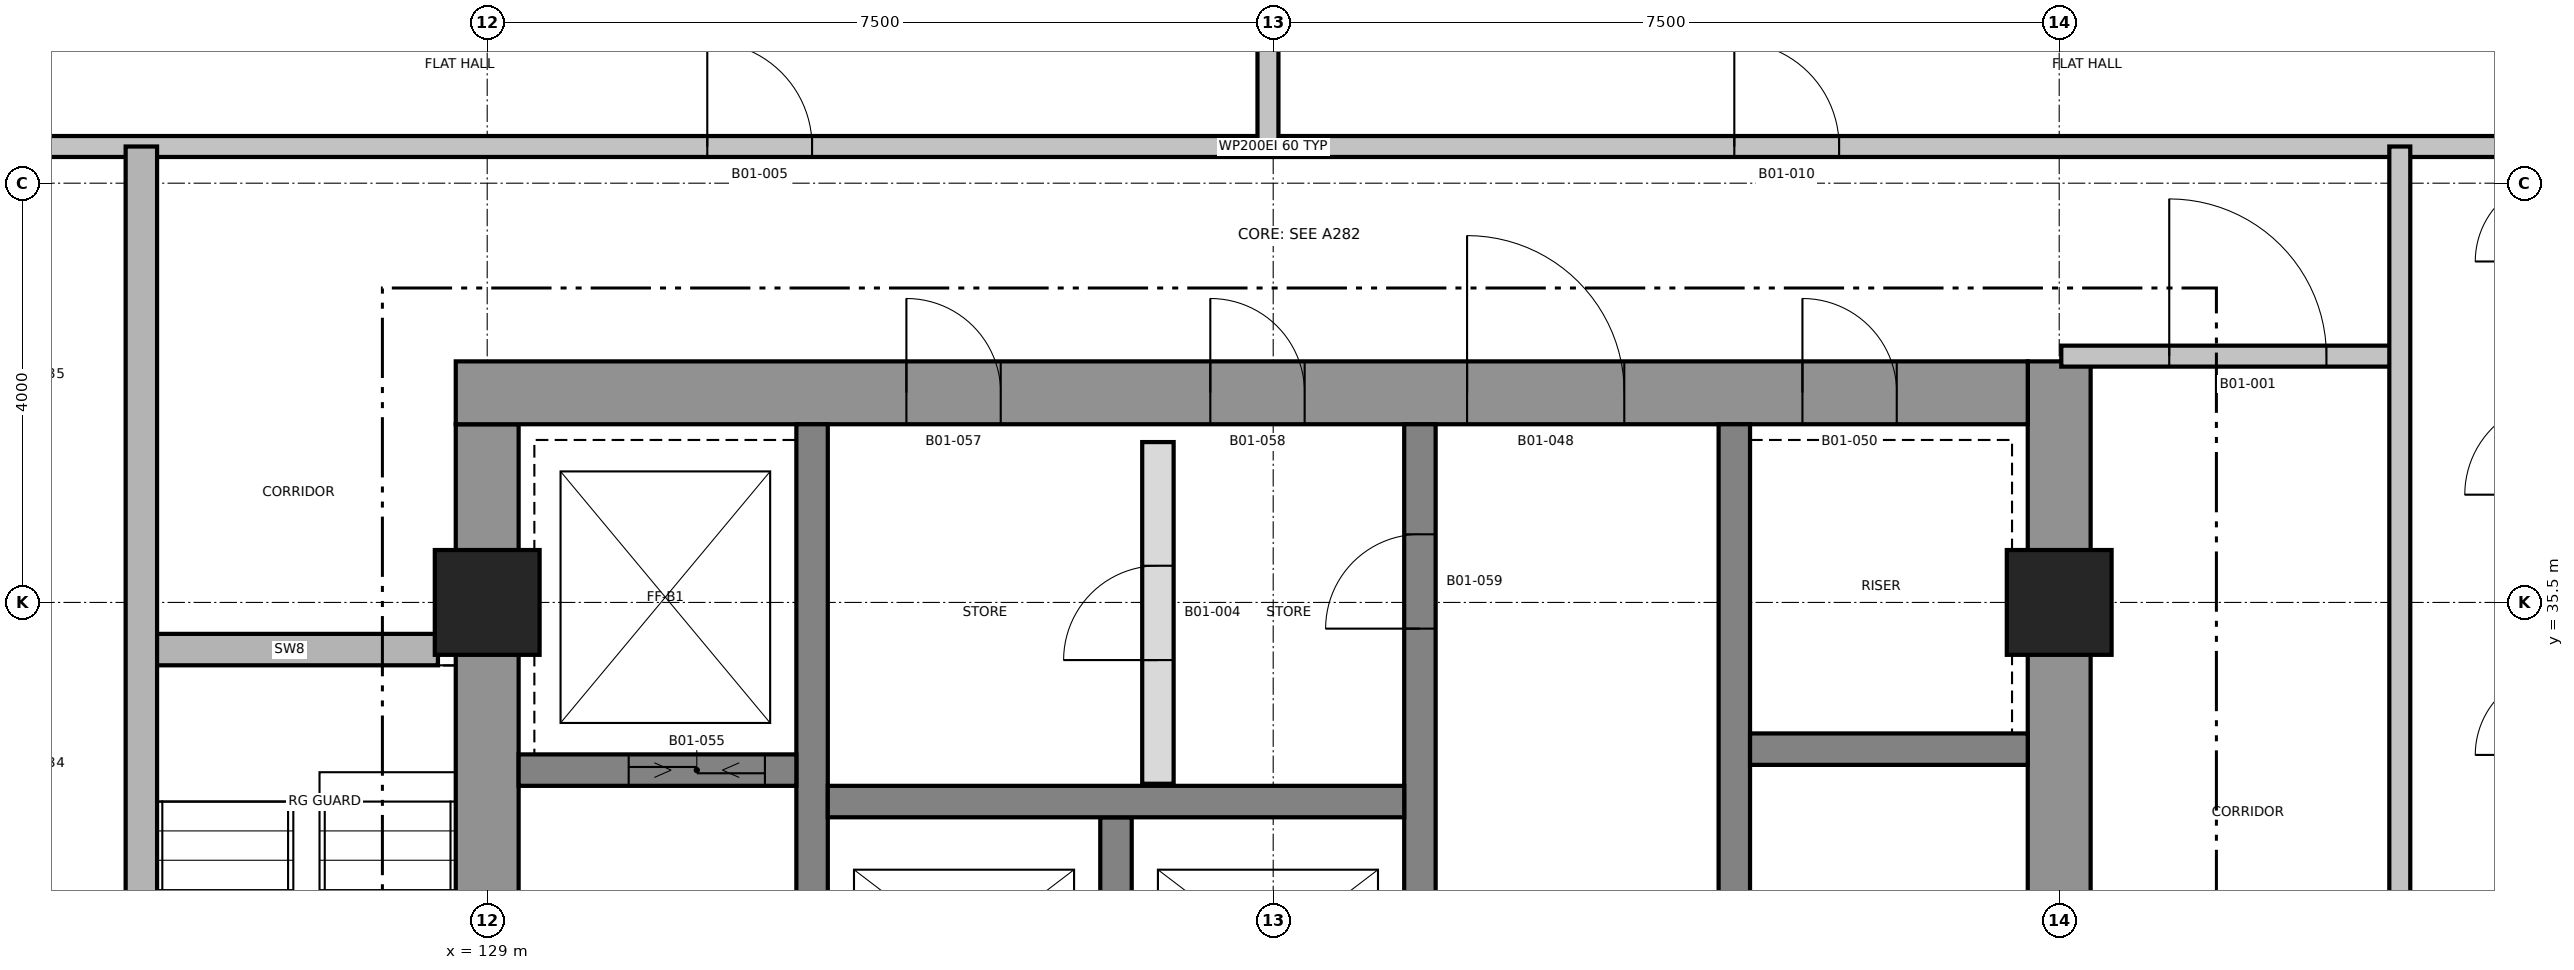
"""IFC4 building model, lengths in metres.
Left out: names, types, materials, properties, quantities, classifications, styles, units other than length and angle.
Written with IfcOpenShell. Run it as: python <this file> out.ifc"""

import sys

from ifc_helpers import new_model, si_unit, direction, frame, frame_2d, origin, origin_2d, place, context, subcontext, project, spatial, rectangle, extrude, element, fill, save


model = new_model("IFC4")
c1 = context("Model", 3, precision=1e-05, world=origin(), true_north=direction((0.0, 1.0)))
c2 = subcontext(c1, "Body", "Model", "MODEL_VIEW")
j1 = project(units=[si_unit("LENGTHUNIT", "METRE"), si_unit("PLANEANGLEUNIT", "RADIAN")], contexts=[c1])
p1 = place(None, origin())
s1 = spatial("IfcSite", under=j1, at=p1, CompositionType="ELEMENT")
p2 = place(p1, origin())
s2 = spatial("IfcBuilding", under=s1, at=p2, CompositionType="ELEMENT")
p3 = place(p2, frame((0.0, 0.0, 37.2)))
s3 = spatial("IfcBuildingStorey", under=s2, at=p3, CompositionType="ELEMENT", Elevation=37.2)
p4 = place(p3, frame((129.0, 24.8, 0.0), z_axis=(0.0, 0.0, 1.0), x_axis=(0.0, 1.0, 0.0)))
e1 = element("IfcWall", 1, at=p4, inside=s3, PredefinedType="SHEAR", context=c2, shape_type="SweptSolid", body=[
    extrude(rectangle(XDim=12.4, YDim=0.6, at=frame_2d((6.2, 0.0))), origin(), (0.0, 0.0, 1.0), 3.7),
])
p5 = place(p4, frame((5.15, 0.0, 0.0)))
e2 = element("IfcOpeningElement", 2, at=p5, cuts=e1, PredefinedType="OPENING", context=c2, shape_type="SweptSolid", body=[
    extrude(rectangle(XDim=1.0, YDim=2.1, at=frame_2d((0.5, 1.05))), frame((0.0, 0.31, 0.0), z_axis=(0.0, -1.0, 0.0), x_axis=(1.0, 0.0, 0.0)), (0.0, 0.0, 1.0), 0.62),
])
p6 = place(p3, frame((144.0, 24.2, 0.0), z_axis=(0.0, 0.0, 1.0), x_axis=(0.0, 1.0, 0.0)))
e3 = element("IfcWall", 3, at=p6, inside=s3, PredefinedType="SHEAR", context=c2, shape_type="SweptSolid", body=[
    extrude(rectangle(XDim=13.6, YDim=0.6, at=frame_2d((6.8, 0.0))), origin(), (0.0, 0.0, 1.0), 3.7),
])
p7 = place(p3, frame((128.7, 37.5, 0.0), z_axis=(0.0, 0.0, 1.0), x_axis=(1.0, 0.0, 0.0)))
e4 = element("IfcWall", 4, at=p7, inside=s3, PredefinedType="SHEAR", context=c2, shape_type="SweptSolid", body=[
    extrude(rectangle(XDim=15.0, YDim=0.6, at=frame_2d((7.5, 0.0))), origin(), (0.0, 0.0, 1.0), 3.7),
])
p8 = place(p7, frame((9.65, 0.0, 0.0)))
e5 = element("IfcOpeningElement", 5, at=p8, cuts=e4, PredefinedType="OPENING", context=c2, shape_type="SweptSolid", body=[
    extrude(rectangle(XDim=1.5, YDim=2.1, at=frame_2d((0.75, 1.05))), frame((0.0, 0.31, 0.0), z_axis=(0.0, -1.0, 0.0), x_axis=(1.0, 0.0, 0.0)), (0.0, 0.0, 1.0), 0.62),
])
p9 = place(p7, frame((12.85, 0.0, 0.0)))
e6 = element("IfcOpeningElement", 6, at=p9, cuts=e4, PredefinedType="OPENING", context=c2, shape_type="SweptSolid", body=[
    extrude(rectangle(XDim=0.9, YDim=2.1, at=frame_2d((0.45, 1.05))), frame((0.0, 0.31, 0.0), z_axis=(0.0, -1.0, 0.0), x_axis=(1.0, 0.0, 0.0)), (0.0, 0.0, 1.0), 0.62),
])
p10 = place(p7, frame((4.3, 0.0, 0.0)))
e7 = element("IfcOpeningElement", 7, at=p10, cuts=e4, PredefinedType="OPENING", context=c2, shape_type="SweptSolid", body=[
    extrude(rectangle(XDim=0.9, YDim=2.1, at=frame_2d((0.45, 1.05))), frame((0.0, 0.31, 0.0), z_axis=(0.0, -1.0, 0.0), x_axis=(1.0, 0.0, 0.0)), (0.0, 0.0, 1.0), 0.62),
])
p11 = place(p7, frame((7.2, 0.0, 0.0)))
e8 = element("IfcOpeningElement", 8, at=p11, cuts=e4, PredefinedType="OPENING", context=c2, shape_type="SweptSolid", body=[
    extrude(rectangle(XDim=0.9, YDim=2.1, at=frame_2d((0.45, 1.05))), frame((0.0, 0.31, 0.0), z_axis=(0.0, -1.0, 0.0), x_axis=(1.0, 0.0, 0.0)), (0.0, 0.0, 1.0), 0.62),
])
p12 = place(p3, frame((132.1, 24.8, 0.0), z_axis=(0.0, 0.0, 1.0), x_axis=(0.0, 1.0, 0.0)))
e9 = element("IfcWall", 9, at=p12, inside=s3, PredefinedType="SHEAR", context=c2, shape_type="SweptSolid", body=[
    extrude(rectangle(XDim=12.4, YDim=0.3, at=frame_2d((6.2, 0.0))), origin(), (0.0, 0.0, 1.0), 3.7),
])
p13 = place(p12, frame((3.9, 0.0, 0.0)))
e10 = element("IfcOpeningElement", 10, at=p13, cuts=e9, PredefinedType="OPENING", context=c2, shape_type="SweptSolid", body=[
    extrude(rectangle(XDim=1.2, YDim=2.1, at=frame_2d((0.6, 1.05))), frame((0.0, 0.16, 0.0), z_axis=(0.0, -1.0, 0.0), x_axis=(1.0, 0.0, 0.0)), (0.0, 0.0, 1.0), 0.32),
])
p14 = place(p3, frame((137.9, 24.8, 0.0), z_axis=(0.0, 0.0, 1.0), x_axis=(0.0, 1.0, 0.0)))
e11 = element("IfcWall", 11, at=p14, inside=s3, PredefinedType="SHEAR", context=c2, shape_type="SweptSolid", body=[
    extrude(rectangle(XDim=12.4, YDim=0.3, at=frame_2d((6.2, 0.0))), origin(), (0.0, 0.0, 1.0), 3.7),
])
p15 = place(p14, frame((3.95, 0.0, 0.0)))
e12 = element("IfcOpeningElement", 12, at=p15, cuts=e11, PredefinedType="OPENING", context=c2, shape_type="SweptSolid", body=[
    extrude(rectangle(XDim=1.5, YDim=2.1, at=frame_2d((0.75, 1.05))), frame((0.0, 0.16, 0.0), z_axis=(0.0, -1.0, 0.0), x_axis=(1.0, 0.0, 0.0)), (0.0, 0.0, 1.0), 0.32),
])
p16 = place(p14, frame((10.45, 0.0, 0.0)))
e13 = element("IfcOpeningElement", 13, at=p16, cuts=e11, PredefinedType="OPENING", context=c2, shape_type="SweptSolid", body=[
    extrude(rectangle(XDim=0.9, YDim=2.1, at=frame_2d((0.45, 1.05))), frame((0.0, 0.16, 0.0), z_axis=(0.0, -1.0, 0.0), x_axis=(1.0, 0.0, 0.0)), (0.0, 0.0, 1.0), 0.32),
])
p17 = place(p3, frame((140.9, 24.8, 0.0), z_axis=(0.0, 0.0, 1.0), x_axis=(0.0, 1.0, 0.0)))
e14 = element("IfcWall", 14, at=p17, inside=s3, PredefinedType="SHEAR", context=c2, shape_type="SweptSolid", body=[
    extrude(rectangle(XDim=12.4, YDim=0.3, at=frame_2d((6.2, 0.0))), origin(), (0.0, 0.0, 1.0), 3.7),
])
p18 = place(p17, frame((5.9, 0.0, 0.0)))
e15 = element("IfcOpeningElement", 15, at=p18, cuts=e14, PredefinedType="OPENING", context=c2, shape_type="SweptSolid", body=[
    extrude(rectangle(XDim=1.2, YDim=2.1, at=frame_2d((0.6, 1.05))), frame((0.0, 0.16, 0.0), z_axis=(0.0, -1.0, 0.0), x_axis=(1.0, 0.0, 0.0)), (0.0, 0.0, 1.0), 0.32),
])
p19 = place(p3, frame((135.0, 30.85, 0.0), z_axis=(0.0, 0.0, 1.0), x_axis=(0.0, 1.0, 0.0)))
e16 = element("IfcWall", 16, at=p19, inside=s3, PredefinedType="SHEAR", context=c2, shape_type="SweptSolid", body=[
    extrude(rectangle(XDim=2.6, YDim=0.3, at=frame_2d((1.3, 0.0))), origin(), (0.0, 0.0, 1.0), 3.7),
])
p20 = place(p3, frame((132.25, 33.6, 0.0), z_axis=(0.0, 0.0, 1.0), x_axis=(1.0, 0.0, 0.0)))
e17 = element("IfcWall", 17, at=p20, inside=s3, PredefinedType="SHEAR", context=c2, shape_type="SweptSolid", body=[
    extrude(rectangle(XDim=5.5, YDim=0.3, at=frame_2d((2.75, 0.0))), origin(), (0.0, 0.0, 1.0), 3.7),
])
p21 = place(p3, frame((129.3, 33.9, 0.0), z_axis=(0.0, 0.0, 1.0), x_axis=(1.0, 0.0, 0.0)))
e18 = element("IfcWall", 18, at=p21, inside=s3, PredefinedType="SHEAR", context=c2, shape_type="SweptSolid", body=[
    extrude(rectangle(XDim=2.65, YDim=0.3, at=frame_2d((1.325, 0.0))), origin(), (0.0, 0.0, 1.0), 3.7),
])
p22 = place(p21, frame((1.05, 0.0, 0.0)))
e19 = element("IfcOpeningElement", 19, at=p22, cuts=e18, PredefinedType="OPENING", context=c2, shape_type="SweptSolid", body=[
    extrude(rectangle(XDim=1.3, YDim=2.4, at=frame_2d((0.65, 1.2))), frame((0.0, 0.16, 0.0), z_axis=(0.0, -1.0, 0.0), x_axis=(1.0, 0.0, 0.0)), (0.0, 0.0, 1.0), 0.32),
])
p23 = place(p3, frame((141.05, 34.1, 0.0), z_axis=(0.0, 0.0, 1.0), x_axis=(1.0, 0.0, 0.0)))
e20 = element("IfcWall", 20, at=p23, inside=s3, PredefinedType="SHEAR", context=c2, shape_type="SweptSolid", body=[
    extrude(rectangle(XDim=2.65, YDim=0.3, at=frame_2d((1.325, 0.0))), origin(), (0.0, 0.0, 1.0), 3.7),
])
for number, where, z_axis, x_axis in (
    (21, (129.0, 35.5, 0.0), (0.0, 0.0, 1.0), (1.0, 0.0, 0.0)),
    (22, (144.0, 35.5, 0.0), (0.0, 0.0, 1.0), (1.0, 0.0, 0.0)),
):
    element("IfcColumn", number, at=place(p3, frame(where, z_axis=z_axis, x_axis=x_axis)), inside=s3, PredefinedType="COLUMN", context=c2, shape_type="SweptSolid", body=[
        extrude(rectangle(XDim=1.0, YDim=1.0, at=origin_2d()), origin(), (0.0, 0.0, 1.0), 3.7),
    ])
p24 = place(p3, frame((125.7, 35.05, 0.0), z_axis=(0.0, 0.0, 1.0), x_axis=(1.0, 0.0, 0.0)))
e23 = element("IfcWall", 23, at=p24, inside=s3, PredefinedType="SHEAR", context=c2, shape_type="SweptSolid", body=[
    extrude(rectangle(XDim=2.83, YDim=0.3, at=frame_2d((1.415, 0.0))), origin(), (0.0, 0.0, 1.0), 3.4),
])
p25 = place(p3, frame((144.02, 37.85, 0.0), z_axis=(0.0, 0.0, 1.0), x_axis=(1.0, 0.0, 0.0)))
e24 = element("IfcWall", 24, at=p25, inside=s3, PredefinedType="PARTITIONING", context=c2, shape_type="SweptSolid", body=[
    extrude(rectangle(XDim=3.23, YDim=0.2, at=frame_2d((1.615, 0.0))), origin(), (0.0, 0.0, 1.0), 3.4),
])
p26 = place(p25, frame((1.03, 0.0, 0.0)))
e25 = element("IfcOpeningElement", 25, at=p26, cuts=e24, PredefinedType="OPENING", context=c2, shape_type="SweptSolid", body=[
    extrude(rectangle(XDim=1.5, YDim=2.1, at=frame_2d((0.75, 1.05))), frame((0.0, 0.11, 0.0), z_axis=(0.0, -1.0, 0.0), x_axis=(1.0, 0.0, 0.0)), (0.0, 0.0, 1.0), 0.22),
])
p27 = place(p3, frame((120.89, 39.85, 0.0), z_axis=(0.0, 0.0, 1.0), x_axis=(1.0, 0.0, 0.0)))
e26 = element("IfcWall", 26, at=p27, inside=s3, PredefinedType="PARTITIONING", context=c2, shape_type="SweptSolid", body=[
    extrude(rectangle(XDim=31.22, YDim=0.2, at=frame_2d((15.61, 0.0))), origin(), (0.0, 0.0, 1.0), 3.4),
])
p28 = place(p27, frame((10.21, 0.0, 0.0)))
e27 = element("IfcOpeningElement", 27, at=p28, cuts=e26, PredefinedType="OPENING", context=c2, shape_type="SweptSolid", body=[
    extrude(rectangle(XDim=1.0, YDim=2.1, at=frame_2d((0.5, 1.05))), frame((0.0, 0.11, 0.0), z_axis=(0.0, -1.0, 0.0), x_axis=(1.0, 0.0, 0.0)), (0.0, 0.0, 1.0), 0.22),
])
p29 = place(p27, frame((20.01, 0.0, 0.0)))
e28 = element("IfcOpeningElement", 28, at=p29, cuts=e26, PredefinedType="OPENING", context=c2, shape_type="SweptSolid", body=[
    extrude(rectangle(XDim=1.0, YDim=2.1, at=frame_2d((0.5, 1.05))), frame((0.0, 0.11, 0.0), z_axis=(0.0, -1.0, 0.0), x_axis=(1.0, 0.0, 0.0)), (0.0, 0.0, 1.0), 0.22),
])
p30 = place(p3, frame((125.7, 22.15, 0.0), z_axis=(0.0, 0.0, 1.0), x_axis=(0.0, 1.0, 0.0)))
e29 = element("IfcWall", 29, at=p30, inside=s3, PredefinedType="SHEAR", context=c2, shape_type="SweptSolid", body=[
    extrude(rectangle(XDim=17.7, YDim=0.3, at=frame_2d((8.85, 0.0))), origin(), (0.0, 0.0, 1.0), 3.4),
])
p31 = place(p30, frame((2.7, 0.0, 0.0)))
e30 = element("IfcOpeningElement", 30, at=p31, cuts=e29, PredefinedType="OPENING", context=c2, shape_type="SweptSolid", body=[
    extrude(rectangle(XDim=1.0, YDim=2.1, at=frame_2d((0.5, 1.05))), frame((0.0, 0.16, 0.0), z_axis=(0.0, -1.0, 0.0), x_axis=(1.0, 0.0, 0.0)), (0.0, 0.0, 1.0), 0.32),
])
p32 = place(p3, frame((135.4, 33.77, 0.0), z_axis=(0.0, 0.0, 1.0), x_axis=(0.0, 1.0, 0.0)))
e31 = element("IfcWall", 31, at=p32, inside=s3, PredefinedType="PARTITIONING", context=c2, shape_type="SweptSolid", body=[
    extrude(rectangle(XDim=3.26, YDim=0.3, at=frame_2d((1.63, 0.0))), origin(), (0.0, 0.0, 1.0), 3.4),
])
p33 = place(p32, frame((1.18, 0.0, 0.0)))
e32 = element("IfcOpeningElement", 32, at=p33, cuts=e31, PredefinedType="OPENING", context=c2, shape_type="SweptSolid", body=[
    extrude(rectangle(XDim=0.9, YDim=2.1, at=frame_2d((0.45, 1.05))), frame((0.0, 0.16, 0.0), z_axis=(0.0, -1.0, 0.0), x_axis=(1.0, 0.0, 0.0)), (0.0, 0.0, 1.0), 0.32),
])
p34 = place(p3, frame((136.45, 39.85, 0.0), z_axis=(0.0, 0.0, 1.0), x_axis=(0.0, 1.0, 0.0)))
e33 = element("IfcWall", 33, at=p34, inside=s3, PredefinedType="PARTITIONING", context=c2, shape_type="SweptSolid", body=[
    extrude(rectangle(XDim=5.26, YDim=0.2, at=frame_2d((2.63, 0.0))), origin(), (0.0, 0.0, 1.0), 3.4),
])
p35 = place(p3, frame((147.25, 22.15, 0.0), z_axis=(0.0, 0.0, 1.0), x_axis=(0.0, 1.0, 0.0)))
e34 = element("IfcWall", 34, at=p35, inside=s3, PredefinedType="PARTITIONING", context=c2, shape_type="SweptSolid", body=[
    extrude(rectangle(XDim=17.7, YDim=0.2, at=frame_2d((8.85, 0.0))), origin(), (0.0, 0.0, 1.0), 3.4),
])
p36 = place(p35, frame((2.65, 0.0, 0.0)))
e35 = element("IfcOpeningElement", 35, at=p36, cuts=e34, PredefinedType="OPENING", context=c2, shape_type="SweptSolid", body=[
    extrude(rectangle(XDim=1.0, YDim=2.1, at=frame_2d((0.5, 1.05))), frame((0.0, 0.11, 0.0), z_axis=(0.0, -1.0, 0.0), x_axis=(1.0, 0.0, 0.0)), (0.0, 0.0, 1.0), 0.22),
])
p37 = place(p26, origin())
e36 = element("IfcDoor", 36, at=p37, inside=s3, OperationType="SINGLE_SWING_LEFT", PredefinedType="DOOR", context=c2, shape_type="SweptSolid", body=[
    extrude(rectangle(XDim=1.5, YDim=2.1, at=frame_2d((0.75, 1.05))), frame((0.0, 0.025, 0.0), z_axis=(0.0, -1.0, 0.0), x_axis=(1.0, 0.0, 0.0)), (0.0, 0.0, 1.0), 0.05),
])
fill(e25, e36)
p38 = place(p33, origin())
e37 = element("IfcDoor", 37, at=p38, inside=s3, OperationType="SINGLE_SWING_RIGHT", PredefinedType="DOOR", context=c2, shape_type="SweptSolid", body=[
    extrude(rectangle(XDim=0.9, YDim=2.1, at=frame_2d((0.45, 1.05))), frame((0.0, 0.025, 0.0), z_axis=(0.0, -1.0, 0.0), x_axis=(1.0, 0.0, 0.0)), (0.0, 0.0, 1.0), 0.05),
])
fill(e32, e37)
p39 = place(p28, origin())
e38 = element("IfcDoor", 38, at=p39, inside=s3, OperationType="SINGLE_SWING_LEFT", PredefinedType="DOOR", context=c2, shape_type="SweptSolid", body=[
    extrude(rectangle(XDim=1.0, YDim=2.1, at=frame_2d((0.5, 1.05))), frame((0.0, 0.025, 0.0), z_axis=(0.0, -1.0, 0.0), x_axis=(1.0, 0.0, 0.0)), (0.0, 0.0, 1.0), 0.05),
])
fill(e27, e38)
p40 = place(p29, origin())
e39 = element("IfcDoor", 39, at=p40, inside=s3, OperationType="SINGLE_SWING_RIGHT", PredefinedType="DOOR", context=c2, shape_type="SweptSolid", body=[
    extrude(rectangle(XDim=1.0, YDim=2.1, at=frame_2d((0.5, 1.05))), frame((0.0, 0.025, 0.0), z_axis=(0.0, -1.0, 0.0), x_axis=(1.0, 0.0, 0.0)), (0.0, 0.0, 1.0), 0.05),
])
fill(e28, e39)
p41 = place(p8, origin())
e40 = element("IfcDoor", 40, at=p41, inside=s3, OperationType="SINGLE_SWING_RIGHT", PredefinedType="DOOR", context=c2, shape_type="SweptSolid", body=[
    extrude(rectangle(XDim=1.5, YDim=2.1, at=frame_2d((0.75, 1.05))), frame((0.0, 0.025, 0.0), z_axis=(0.0, -1.0, 0.0), x_axis=(1.0, 0.0, 0.0)), (0.0, 0.0, 1.0), 0.05),
])
fill(e5, e40)
p42 = place(p9, origin())
e41 = element("IfcDoor", 41, at=p42, inside=s3, OperationType="SINGLE_SWING_RIGHT", PredefinedType="DOOR", context=c2, shape_type="SweptSolid", body=[
    extrude(rectangle(XDim=0.9, YDim=2.1, at=frame_2d((0.45, 1.05))), frame((0.0, 0.025, 0.0), z_axis=(0.0, -1.0, 0.0), x_axis=(1.0, 0.0, 0.0)), (0.0, 0.0, 1.0), 0.05),
])
fill(e6, e41)
p43 = place(p22, origin())
e42 = element("IfcDoor", 42, at=p43, inside=s3, OperationType="SLIDING_TO_LEFT", PredefinedType="DOOR", context=c2, shape_type="SweptSolid", body=[
    extrude(rectangle(XDim=1.3, YDim=2.4, at=frame_2d((0.65, 1.2))), frame((0.0, 0.025, 0.0), z_axis=(0.0, -1.0, 0.0), x_axis=(1.0, 0.0, 0.0)), (0.0, 0.0, 1.0), 0.05),
])
fill(e19, e42)
p44 = place(p10, origin())
e43 = element("IfcDoor", 43, at=p44, inside=s3, OperationType="SINGLE_SWING_LEFT", PredefinedType="DOOR", context=c2, shape_type="SweptSolid", body=[
    extrude(rectangle(XDim=0.9, YDim=2.1, at=frame_2d((0.45, 1.05))), frame((0.0, 0.025, 0.0), z_axis=(0.0, -1.0, 0.0), x_axis=(1.0, 0.0, 0.0)), (0.0, 0.0, 1.0), 0.05),
])
fill(e7, e43)
p45 = place(p11, origin())
e44 = element("IfcDoor", 44, at=p45, inside=s3, OperationType="SINGLE_SWING_RIGHT", PredefinedType="DOOR", context=c2, shape_type="SweptSolid", body=[
    extrude(rectangle(XDim=0.9, YDim=2.1, at=frame_2d((0.45, 1.05))), frame((0.0, 0.025, 0.0), z_axis=(0.0, -1.0, 0.0), x_axis=(1.0, 0.0, 0.0)), (0.0, 0.0, 1.0), 0.05),
])
fill(e8, e44)
p46 = place(p16, origin())
e45 = element("IfcDoor", 45, at=p46, inside=s3, OperationType="SINGLE_SWING_RIGHT", PredefinedType="DOOR", context=c2, shape_type="SweptSolid", body=[
    extrude(rectangle(XDim=0.9, YDim=2.1, at=frame_2d((0.45, 1.05))), frame((0.0, 0.025, 0.0), z_axis=(0.0, -1.0, 0.0), x_axis=(1.0, 0.0, 0.0)), (0.0, 0.0, 1.0), 0.05),
])
fill(e13, e45)
save(model, sys.argv[1])
